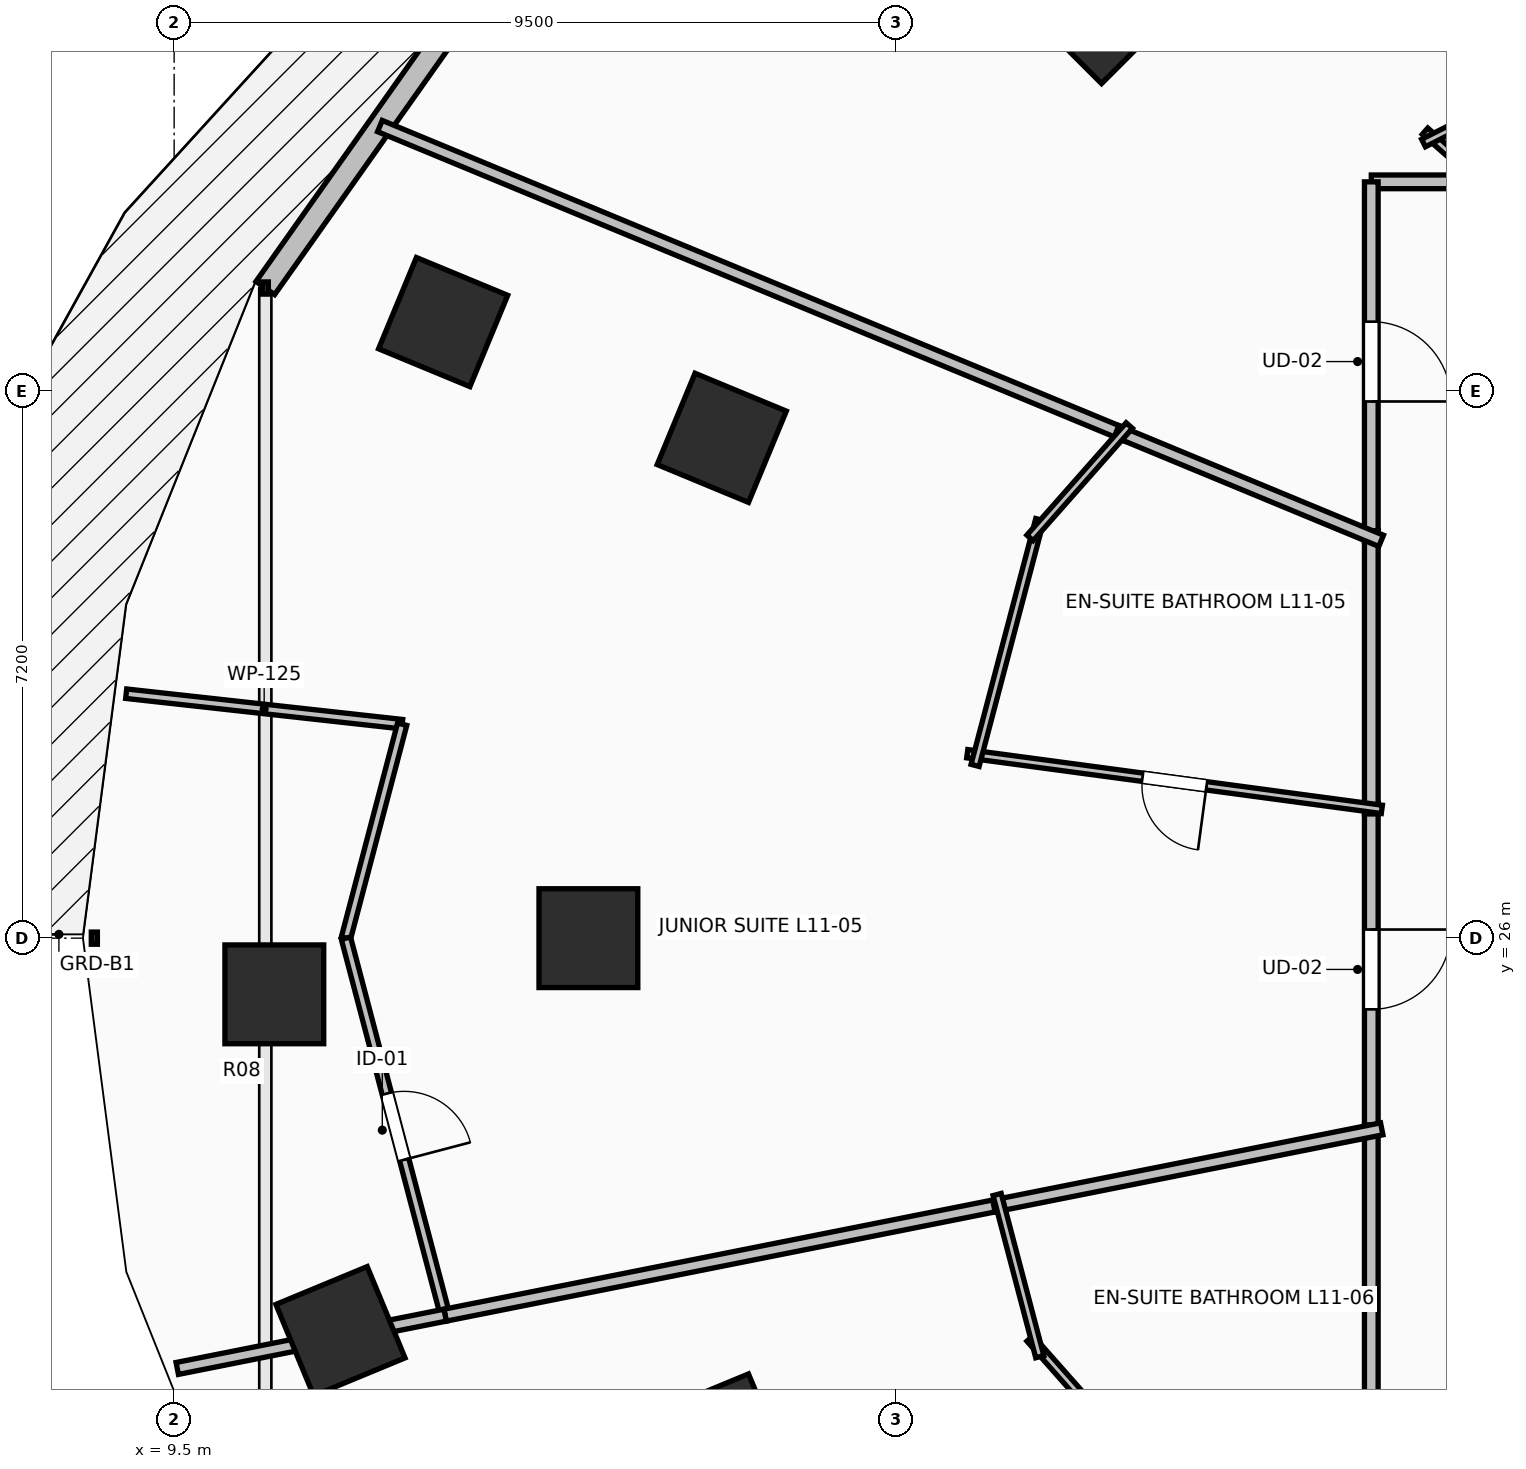
"""IFC4 building model, lengths in metres.
Left out: names, types, materials, properties, quantities, classifications, styles, units other than length and angle.
Written with IfcOpenShell. Run it as: python <this file> out.ifc"""

import sys

from ifc_helpers import new_model, si_unit, direction, frame, frame_2d, origin, origin_2d, place, context, subcontext, project, spatial, rectangle, extrude, element, fill, save


model = new_model("IFC4")
c1 = context("Model", 3, precision=1e-05, world=origin(), true_north=direction((0.0, 1.0)))
c2 = subcontext(c1, "Body", "Model", "MODEL_VIEW")
j1 = project(units=[si_unit("LENGTHUNIT", "METRE"), si_unit("PLANEANGLEUNIT", "RADIAN")], contexts=[c1])
p1 = place(None, origin())
s1 = spatial("IfcSite", under=j1, at=p1, CompositionType="ELEMENT")
p2 = place(p1, origin())
s2 = spatial("IfcBuilding", under=s1, at=p2, CompositionType="ELEMENT")
p3 = place(p2, frame((0.0, 0.0, 45.0)))
s3 = spatial("IfcBuildingStorey", under=s2, at=p3, CompositionType="ELEMENT", Elevation=45.0)
for number, where, z_axis, x_axis in (
    (1, (21.701, 38.162, 0.0), (0.0, 0.0, 1.0), (-0.707, 0.707, 0.0)),
    (2, (16.705, 32.582, 0.0), (0.0, 0.0, 1.0), (-0.924, 0.383, 0.0)),
    (3, (14.95, 26.0, 0.0), (0.0, 0.0, 1.0), (-1.0, 0.0, 0.0)),
    (4, (16.705, 19.418, 0.0), (0.0, 0.0, 1.0), (-0.924, -0.383, 0.0)),
    (5, (13.039, 34.105, 0.0), (0.0, 0.0, 1.0), (-0.924, 0.383, 0.0)),
    (6, (10.818, 25.261, 0.0), (0.0, 0.0, 1.0), (-1.0, 0.0, 0.0)),
    (7, (11.688, 20.83, 0.0), (0.0, 0.0, 1.0), (-0.924, -0.383, 0.0)),
):
    element("IfcColumn", number, at=place(p3, frame(where, z_axis=z_axis, x_axis=x_axis)), inside=s3, PredefinedType="COLUMN", context=c2, shape_type="SweptSolid", body=[
        extrude(rectangle(XDim=1.3, YDim=1.3, at=origin_2d()), origin(), (0.0, 0.0, 1.0), 3.5),
    ])
p4 = place(p3, frame((13.43, 38.417, 0.0), z_axis=(0.0, 0.0, 1.0), x_axis=(-0.577130815624, -0.816651713803, 0.0)))
e8 = element("IfcWall", 8, at=p4, inside=s3, PredefinedType="STANDARD", context=c2, shape_type="SweptSolid", body=[
    extrude(rectangle(XDim=4.731, YDim=0.3, at=frame_2d((2.366, 0.0))), origin(), (0.0, 0.0, 1.0), 3.24),
])
p5 = place(p3, frame((26.774, 35.95, 0.0), z_axis=(0.0, 0.0, 1.0), x_axis=(-1.0, 0.0, 0.0)))
e9 = element("IfcWall", 9, at=p5, inside=s3, PredefinedType="PARTITIONING", context=c2, shape_type="SweptSolid", body=[
    extrude(rectangle(XDim=1.524, YDim=0.18, at=frame_2d((0.762, 0.0))), origin(), (0.0, 0.0, 1.0), 2.886),
])
p6 = place(p3, frame((25.25, 35.95, 0.0), z_axis=(0.0, 0.0, 1.0), x_axis=(0.0, -1.0, 0.0)))
e10 = element("IfcWall", 10, at=p6, inside=s3, PredefinedType="PARTITIONING", context=c2, shape_type="SweptSolid", body=[
    extrude(rectangle(XDim=4.729, YDim=0.18, at=frame_2d((2.365, 0.0))), origin(), (0.0, 0.0, 1.0), 2.432),
])
p7 = place(p6, frame((1.84, 0.0, 0.0)))
e11 = element("IfcOpeningElement", 11, at=p7, cuts=e10, PredefinedType="OPENING", context=c2, shape_type="SweptSolid", body=[
    extrude(rectangle(XDim=1.05, YDim=2.2, at=frame_2d((0.525, 1.1))), frame((0.0, 0.105, 0.0), z_axis=(0.0, -1.0, 0.0), x_axis=(1.0, 0.0, 0.0)), (0.0, 0.0, 1.0), 0.21),
])
p8 = place(p3, frame((25.25, 27.774, 0.0), z_axis=(0.0, 0.0, 1.0), x_axis=(0.0, -1.0, 0.0)))
e12 = element("IfcWall", 12, at=p8, inside=s3, PredefinedType="PARTITIONING", context=c2, shape_type="SweptSolid", body=[
    extrude(rectangle(XDim=4.371, YDim=0.18, at=frame_2d((2.186, 0.0))), origin(), (0.0, 0.0, 1.0), 2.432),
])
p9 = place(p8, frame((1.66, 0.0, 0.0)))
e13 = element("IfcOpeningElement", 13, at=p9, cuts=e12, PredefinedType="OPENING", context=c2, shape_type="SweptSolid", body=[
    extrude(rectangle(XDim=1.05, YDim=2.2, at=frame_2d((0.525, 1.1))), frame((0.0, 0.105, 0.0), z_axis=(0.0, -1.0, 0.0), x_axis=(1.0, 0.0, 0.0)), (0.0, 0.0, 1.0), 0.21),
])
p10 = place(p3, frame((25.25, 31.361, 0.0), z_axis=(0.0, 0.0, 1.0), x_axis=(0.0, -1.0, 0.0)))
e14 = element("IfcWall", 14, at=p10, inside=s3, PredefinedType="PARTITIONING", context=c2, shape_type="SweptSolid", body=[
    extrude(rectangle(XDim=3.727, YDim=0.18, at=frame_2d((1.864, 0.0))), origin(), (0.0, 0.0, 1.0), 2.432),
])
p11 = place(p3, frame((25.25, 23.543, 0.0), z_axis=(0.0, 0.0, 1.0), x_axis=(0.0, -1.0, 0.0)))
e15 = element("IfcWall", 15, at=p11, inside=s3, PredefinedType="PARTITIONING", context=c2, shape_type="SweptSolid", body=[
    extrude(rectangle(XDim=3.869, YDim=0.18, at=frame_2d((1.935, 0.0))), origin(), (0.0, 0.0, 1.0), 3.24),
])
p12 = place(p3, frame((26.819, 35.857, 0.0), z_axis=(0.0, 0.0, 1.0), x_axis=(-0.750624975639, 0.660728496394, 0.0)))
e16 = element("IfcWall", 16, at=p12, inside=s3, PredefinedType="PARTITIONING", context=c2, shape_type="SweptSolid", body=[
    extrude(rectangle(XDim=1.149, YDim=0.11, at=frame_2d((0.574, 0.0))), origin(), (0.0, 0.0, 1.0), 2.886),
])
p13 = place(p3, frame((25.937, 36.461, 0.0), z_axis=(0.0, 0.0, 1.0), x_axis=(0.892461080662, 0.451124394711, 0.0)))
e17 = element("IfcWall", 17, at=p13, inside=s3, PredefinedType="PARTITIONING", context=c2, shape_type="SweptSolid", body=[
    extrude(rectangle(XDim=4.39, YDim=0.11, at=frame_2d((2.195, 0.0))), origin(), (0.0, 0.0, 1.0), 2.432),
])
p14 = place(p13, frame((1.77, 0.0, 0.0)))
e18 = element("IfcOpeningElement", 18, at=p14, cuts=e17, PredefinedType="OPENING", context=c2, shape_type="SweptSolid", body=[
    extrude(rectangle(XDim=0.85, YDim=2.1, at=frame_2d((0.425, 1.05))), frame((0.0, 0.07, 0.0), z_axis=(0.0, -1.0, 0.0), x_axis=(1.0, 0.0, 0.0)), (0.0, 0.0, 1.0), 0.14),
])
p15 = place(p3, frame((12.207, 36.684, 0.0), z_axis=(0.0, 0.0, 1.0), x_axis=(0.923876032578, -0.382691881842, 0.0)))
e19 = element("IfcWall", 19, at=p15, inside=s3, PredefinedType="PARTITIONING", context=c2, shape_type="SweptSolid", body=[
    extrude(rectangle(XDim=10.63, YDim=0.16, at=frame_2d((5.315, 0.0))), origin(), (0.0, 0.0, 1.0), 2.624),
])
p16 = place(p3, frame((21.899, 32.669, 0.0), z_axis=(0.0, 0.0, 1.0), x_axis=(0.923843852071, -0.382769561211, 0.0)))
e20 = element("IfcWall", 20, at=p16, inside=s3, PredefinedType="PARTITIONING", context=c2, shape_type="SweptSolid", body=[
    extrude(rectangle(XDim=3.768, YDim=0.16, at=frame_2d((1.884, 0.0))), origin(), (0.0, 0.0, 1.0), 2.886),
])
p17 = place(p3, frame((25.389, 27.694, 0.0), z_axis=(0.0, 0.0, 1.0), x_axis=(-0.991111683087, 0.133032445848, 0.0)))
e21 = element("IfcWall", 21, at=p17, inside=s3, PredefinedType="PARTITIONING", context=c2, shape_type="SweptSolid", body=[
    extrude(rectangle(XDim=5.504, YDim=0.11, at=frame_2d((2.752, 0.0))), origin(), (0.0, 0.0, 1.0), 2.432),
])
p18 = place(p17, frame((2.327, 0.0, 0.0)))
e22 = element("IfcOpeningElement", 22, at=p18, cuts=e21, PredefinedType="OPENING", context=c2, shape_type="SweptSolid", body=[
    extrude(rectangle(XDim=0.85, YDim=2.1, at=frame_2d((0.425, 1.05))), frame((0.0, 0.07, 0.0), z_axis=(0.0, -1.0, 0.0), x_axis=(1.0, 0.0, 0.0)), (0.0, 0.0, 1.0), 0.14),
])
p19 = place(p3, frame((20.037, 28.273, 0.0), z_axis=(0.0, 0.0, 1.0), x_axis=(0.254593926267, 0.967048050878, 0.0)))
e23 = element("IfcWall", 23, at=p19, inside=s3, PredefinedType="PARTITIONING", context=c2, shape_type="SweptSolid", body=[
    extrude(rectangle(XDim=3.344, YDim=0.11, at=frame_2d((1.672, 0.0))), origin(), (0.0, 0.0, 1.0), 2.432),
])
p20 = place(p3, frame((20.76, 31.266, 0.0), z_axis=(0.0, 0.0, 1.0), x_axis=(0.662047420969, 0.749461948593, 0.0)))
e24 = element("IfcWall", 24, at=p20, inside=s3, PredefinedType="PARTITIONING", context=c2, shape_type="SweptSolid", body=[
    extrude(rectangle(XDim=1.972, YDim=0.11, at=frame_2d((0.986, 0.0))), origin(), (0.0, 0.0, 1.0), 3.24),
])
p21 = place(p3, frame((8.869, 29.216, 0.0), z_axis=(0.0, 0.0, 1.0), x_axis=(0.99395362386, -0.109800699523, 0.0)))
e25 = element("IfcWall", 25, at=p21, inside=s3, PredefinedType="PARTITIONING", context=c2, shape_type="SweptSolid", body=[
    extrude(rectangle(XDim=3.653, YDim=0.125, at=frame_2d((1.827, 0.0))), origin(), (0.0, 0.0, 1.0), 2.624),
])
p22 = place(p3, frame((12.5, 28.815, 0.0), z_axis=(0.0, 0.0, 1.0), x_axis=(-0.254241432202, -0.967140783005, 0.0)))
e26 = element("IfcWall", 26, at=p22, inside=s3, PredefinedType="PARTITIONING", context=c2, shape_type="SweptSolid", body=[
    extrude(rectangle(XDim=2.911, YDim=0.125, at=frame_2d((1.455, 0.0))), origin(), (0.0, 0.0, 1.0), 3.24),
])
p23 = place(p3, frame((11.76, 26.0, 0.0), z_axis=(0.0, 0.0, 1.0), x_axis=(0.254434720755, -0.967089950767, 0.0)))
e27 = element("IfcWall", 27, at=p23, inside=s3, PredefinedType="PARTITIONING", context=c2, shape_type="SweptSolid", body=[
    extrude(rectangle(XDim=5.129, YDim=0.125, at=frame_2d((2.564, 0.0))), origin(), (0.0, 0.0, 1.0), 2.432),
])
p24 = place(p23, frame((2.115, 0.0, 0.0)))
e28 = element("IfcOpeningElement", 28, at=p24, cuts=e27, PredefinedType="OPENING", context=c2, shape_type="SweptSolid", body=[
    extrude(rectangle(XDim=0.9, YDim=2.1, at=frame_2d((0.45, 1.05))), frame((0.0, 0.077, 0.0), z_axis=(0.0, -1.0, 0.0), x_axis=(1.0, 0.0, 0.0)), (0.0, 0.0, 1.0), 0.155),
])
p25 = place(p3, frame((13.065, 21.04, 0.0), z_axis=(0.0, 0.0, 1.0), x_axis=(0.980774220135, 0.195145917502, 0.0)))
e29 = element("IfcWall", 29, at=p25, inside=s3, PredefinedType="PARTITIONING", context=c2, shape_type="SweptSolid", body=[
    extrude(rectangle(XDim=7.501, YDim=0.16, at=frame_2d((3.751, 0.0))), origin(), (0.0, 0.0, 1.0), 2.972),
])
p26 = place(p3, frame((20.285, 22.476, 0.0), z_axis=(0.0, 0.0, 1.0), x_axis=(0.980785905074, 0.195087181559, 0.0)))
e30 = element("IfcWall", 30, at=p26, inside=s3, PredefinedType="PARTITIONING", context=c2, shape_type="SweptSolid", body=[
    extrude(rectangle(XDim=5.202, YDim=0.16, at=frame_2d((2.601, 0.0))), origin(), (0.0, 0.0, 1.0), 2.886),
])
p27 = place(p3, frame((9.541, 20.339, 0.0), z_axis=(0.0, 0.0, 1.0), x_axis=(0.980786594985, 0.195083713053, 0.0)))
e31 = element("IfcWall", 31, at=p27, inside=s3, PredefinedType="PARTITIONING", context=c2, shape_type="SweptSolid", body=[
    extrude(rectangle(XDim=3.593, YDim=0.16, at=frame_2d((1.796, 0.0))), origin(), (0.0, 0.0, 1.0), 2.432),
])
p28 = place(p3, frame((22.814, 18.41, 0.0), z_axis=(0.0, 0.0, 1.0), x_axis=(-0.662186487972, 0.749339078887, 0.0)))
e32 = element("IfcWall", 32, at=p28, inside=s3, PredefinedType="PARTITIONING", context=c2, shape_type="SweptSolid", body=[
    extrude(rectangle(XDim=3.101, YDim=0.11, at=frame_2d((1.551, 0.0))), origin(), (0.0, 0.0, 1.0), 2.886),
])
p29 = place(p28, frame((1.125, 0.0, 0.0)))
e33 = element("IfcOpeningElement", 33, at=p29, cuts=e32, PredefinedType="OPENING", context=c2, shape_type="SweptSolid", body=[
    extrude(rectangle(XDim=0.85, YDim=2.1, at=frame_2d((0.425, 1.05))), frame((0.0, 0.07, 0.0), z_axis=(0.0, -1.0, 0.0), x_axis=(1.0, 0.0, 0.0)), (0.0, 0.0, 1.0), 0.14),
])
p30 = place(p3, frame((20.889, 20.494, 0.0), z_axis=(0.0, 0.0, 1.0), x_axis=(-0.254389812051, 0.967101764823, 0.0)))
e34 = element("IfcWall", 34, at=p30, inside=s3, PredefinedType="PARTITIONING", context=c2, shape_type="SweptSolid", body=[
    extrude(rectangle(XDim=2.206, YDim=0.11, at=frame_2d((1.103, 0.0))), origin(), (0.0, 0.0, 1.0), 3.24),
])
p31 = place(p7, origin())
e35 = element("IfcDoor", 35, at=p31, inside=s3, OperationType="SINGLE_SWING_RIGHT", PredefinedType="DOOR", context=c2, shape_type="SweptSolid", body=[
    extrude(rectangle(XDim=1.05, YDim=2.2, at=frame_2d((0.525, 1.1))), frame((0.0, 0.025, 0.0), z_axis=(0.0, -1.0, 0.0), x_axis=(1.0, 0.0, 0.0)), (0.0, 0.0, 1.0), 0.05),
])
fill(e11, e35)
p32 = place(p9, origin())
e36 = element("IfcDoor", 36, at=p32, inside=s3, OperationType="SINGLE_SWING_LEFT", PredefinedType="DOOR", context=c2, shape_type="SweptSolid", body=[
    extrude(rectangle(XDim=1.05, YDim=2.2, at=frame_2d((0.525, 1.1))), frame((0.0, 0.025, 0.0), z_axis=(0.0, -1.0, 0.0), x_axis=(1.0, 0.0, 0.0)), (0.0, 0.0, 1.0), 0.05),
])
fill(e13, e36)
p33 = place(p18, origin())
e37 = element("IfcDoor", 37, at=p33, inside=s3, OperationType="SINGLE_SWING_LEFT", PredefinedType="DOOR", context=c2, shape_type="SweptSolid", body=[
    extrude(rectangle(XDim=0.85, YDim=2.1, at=frame_2d((0.425, 1.05))), frame((0.0, 0.025, 0.0), z_axis=(0.0, -1.0, 0.0), x_axis=(1.0, 0.0, 0.0)), (0.0, 0.0, 1.0), 0.05),
])
fill(e22, e37)
p34 = place(p24, origin())
e38 = element("IfcDoor", 38, at=p34, inside=s3, OperationType="SINGLE_SWING_RIGHT", PredefinedType="DOOR", context=c2, shape_type="SweptSolid", body=[
    extrude(rectangle(XDim=0.9, YDim=2.1, at=frame_2d((0.45, 1.05))), frame((0.0, 0.025, 0.0), z_axis=(0.0, -1.0, 0.0), x_axis=(1.0, 0.0, 0.0)), (0.0, 0.0, 1.0), 0.05),
])
fill(e28, e38)
save(model, sys.argv[1])
